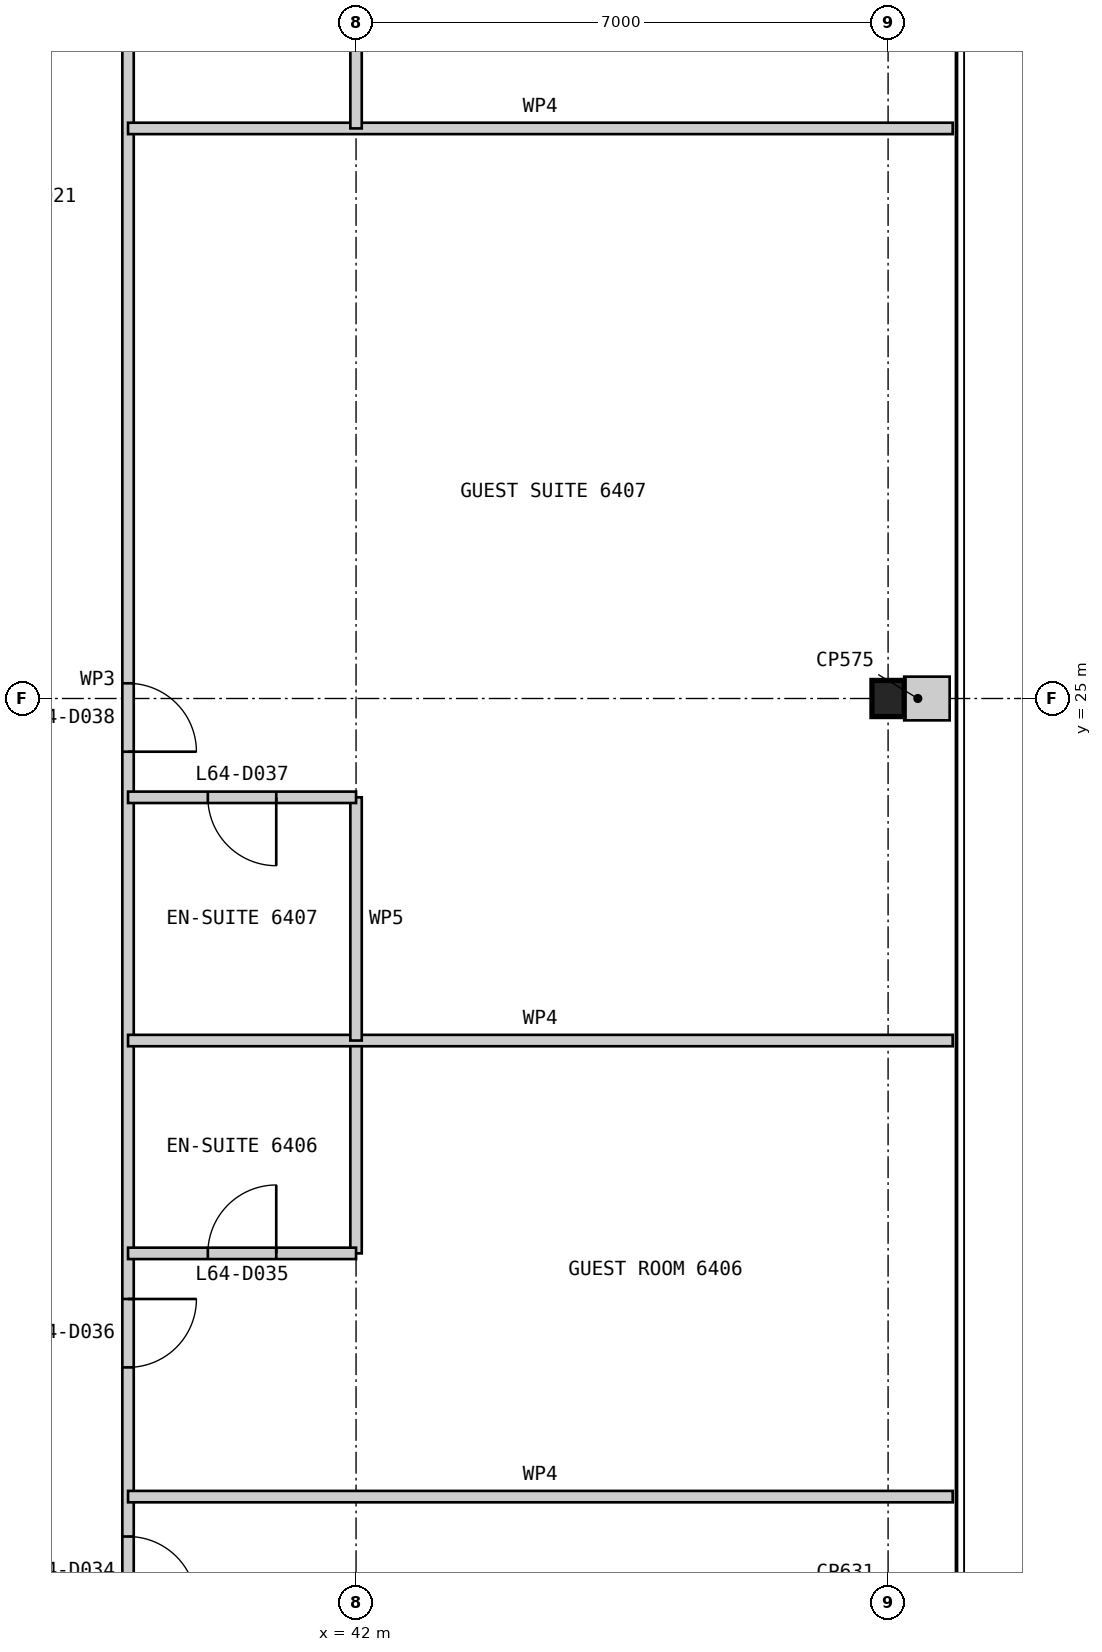
"""IFC4 building model, lengths in metres.
Left out: names, types, materials, properties, quantities, classifications, styles, units other than length and angle.
Written with IfcOpenShell. Run it as: python <this file> out.ifc"""

import sys

from ifc_helpers import new_model, si_unit, direction, frame, frame_2d, origin, origin_2d, place, context, subcontext, project, spatial, rectangle, i_section, extrude, element, fill, save


model = new_model("IFC4")
c1 = context("Model", 3, precision=1e-05, world=origin(), true_north=direction((0.0, 1.0)))
c2 = subcontext(c1, "Body", "Model", "MODEL_VIEW")
j1 = project(units=[si_unit("LENGTHUNIT", "METRE"), si_unit("PLANEANGLEUNIT", "RADIAN")], contexts=[c1])
p1 = place(None, origin())
s1 = spatial("IfcSite", under=j1, at=p1, CompositionType="ELEMENT")
p2 = place(p1, origin())
s2 = spatial("IfcBuilding", under=s1, at=p2, CompositionType="ELEMENT")
p3 = place(p2, frame((0.0, 0.0, 269.6)))
s3 = spatial("IfcBuildingStorey", under=s2, at=p3, CompositionType="ELEMENT", Elevation=269.6)
p4 = place(p3, frame((49.0, 25.0, 0.0), z_axis=(0.0, 0.0, 1.0), x_axis=(1.0, 0.0, 0.0)))
e1 = element("IfcColumn", 1, at=p4, inside=s3, PredefinedType="COLUMN", context=c2, shape_type="SweptSolid", body=[
    extrude(i_section(OverallWidth=0.424, OverallDepth=0.475, WebThickness=0.048, FlangeThickness=0.077, at=origin_2d()), origin(), (0.0, 0.0, 1.0), 3.4),
])
p5 = place(p3, frame((39.0, 11.0, 0.0), z_axis=(0.0, 0.0, 1.0), x_axis=(0.0, 1.0, 0.0)))
e2 = element("IfcWall", 2, at=p5, inside=s3, PredefinedType="PARTITIONING", context=c2, shape_type="SweptSolid", body=[
    extrude(rectangle(XDim=28.0, YDim=0.15, at=frame_2d((14.0, 0.0))), origin(), (0.0, 0.0, 1.0), 2.844),
])
p6 = place(p5, frame((2.075, 0.0, 0.0)))
e3 = element("IfcOpeningElement", 3, at=p6, cuts=e2, PredefinedType="OPENING", context=c2, shape_type="SweptSolid", body=[
    extrude(rectangle(XDim=0.9, YDim=2.1, at=frame_2d((0.45, 1.05))), frame((0.0, 0.085, 0.0), z_axis=(0.0, -1.0, 0.0), x_axis=(1.0, 0.0, 0.0)), (0.0, 0.0, 1.0), 0.17),
])
p7 = place(p5, frame((5.2, 0.0, 0.0)))
e4 = element("IfcOpeningElement", 4, at=p7, cuts=e2, PredefinedType="OPENING", context=c2, shape_type="SweptSolid", body=[
    extrude(rectangle(XDim=0.9, YDim=2.1, at=frame_2d((0.45, 1.05))), frame((0.0, 0.085, 0.0), z_axis=(0.0, -1.0, 0.0), x_axis=(1.0, 0.0, 0.0)), (0.0, 0.0, 1.0), 0.17),
])
p8 = place(p5, frame((13.3, 0.0, 0.0)))
e5 = element("IfcOpeningElement", 5, at=p8, cuts=e2, PredefinedType="OPENING", context=c2, shape_type="SweptSolid", body=[
    extrude(rectangle(XDim=0.9, YDim=2.1, at=frame_2d((0.45, 1.05))), frame((0.0, 0.085, 0.0), z_axis=(0.0, -1.0, 0.0), x_axis=(1.0, 0.0, 0.0)), (0.0, 0.0, 1.0), 0.17),
])
p9 = place(p5, frame((24.9, 0.0, 0.0)))
e6 = element("IfcOpeningElement", 6, at=p9, cuts=e2, PredefinedType="OPENING", context=c2, shape_type="SweptSolid", body=[
    extrude(rectangle(XDim=0.9, YDim=2.1, at=frame_2d((0.45, 1.05))), frame((0.0, 0.085, 0.0), z_axis=(0.0, -1.0, 0.0), x_axis=(1.0, 0.0, 0.0)), (0.0, 0.0, 1.0), 0.17),
])
p10 = place(p3, frame((49.85, 14.5, 0.0), z_axis=(0.0, 0.0, 1.0), x_axis=(-1.0, 0.0, 0.0)))
e7 = element("IfcWall", 7, at=p10, inside=s3, PredefinedType="PARTITIONING", context=c2, shape_type="SweptSolid", body=[
    extrude(rectangle(XDim=10.85, YDim=0.15, at=frame_2d((5.425, 0.0))), origin(), (0.0, 0.0, 1.0), 3.25),
])
p11 = place(p3, frame((42.0, 17.7, 0.0), z_axis=(0.0, 0.0, 1.0), x_axis=(0.0, 1.0, 0.0)))
e8 = element("IfcWall", 8, at=p11, inside=s3, PredefinedType="PARTITIONING", context=c2, shape_type="SweptSolid", body=[
    extrude(rectangle(XDim=2.8, YDim=0.15, at=frame_2d((1.4, 0.0))), origin(), (0.0, 0.0, 1.0), 3.25),
])
p12 = place(p3, frame((42.0, 17.7, 0.0), z_axis=(0.0, 0.0, 1.0), x_axis=(-1.0, 0.0, 0.0)))
e9 = element("IfcWall", 9, at=p12, inside=s3, PredefinedType="PARTITIONING", context=c2, shape_type="SweptSolid", body=[
    extrude(rectangle(XDim=3.0, YDim=0.15, at=frame_2d((1.5, 0.0))), origin(), (0.0, 0.0, 1.0), 3.25),
])
p13 = place(p12, frame((1.05, 0.0, 0.0)))
e10 = element("IfcOpeningElement", 10, at=p13, cuts=e9, PredefinedType="OPENING", context=c2, shape_type="SweptSolid", body=[
    extrude(rectangle(XDim=0.9, YDim=2.1, at=frame_2d((0.45, 1.05))), frame((0.0, 0.085, 0.0), z_axis=(0.0, -1.0, 0.0), x_axis=(1.0, 0.0, 0.0)), (0.0, 0.0, 1.0), 0.17),
])
p14 = place(p3, frame((49.85, 20.5, 0.0), z_axis=(0.0, 0.0, 1.0), x_axis=(-1.0, 0.0, 0.0)))
e11 = element("IfcWall", 11, at=p14, inside=s3, PredefinedType="PARTITIONING", context=c2, shape_type="SweptSolid", body=[
    extrude(rectangle(XDim=10.85, YDim=0.15, at=frame_2d((5.425, 0.0))), origin(), (0.0, 0.0, 1.0), 3.25),
])
p15 = place(p3, frame((42.0, 20.5, 0.0), z_axis=(0.0, 0.0, 1.0), x_axis=(0.0, 1.0, 0.0)))
e12 = element("IfcWall", 12, at=p15, inside=s3, PredefinedType="PARTITIONING", context=c2, shape_type="SweptSolid", body=[
    extrude(rectangle(XDim=3.2, YDim=0.15, at=frame_2d((1.6, 0.0))), origin(), (0.0, 0.0, 1.0), 3.25),
])
p16 = place(p3, frame((42.0, 23.7, 0.0), z_axis=(0.0, 0.0, 1.0), x_axis=(-1.0, 0.0, 0.0)))
e13 = element("IfcWall", 13, at=p16, inside=s3, PredefinedType="PARTITIONING", context=c2, shape_type="SweptSolid", body=[
    extrude(rectangle(XDim=3.0, YDim=0.15, at=frame_2d((1.5, 0.0))), origin(), (0.0, 0.0, 1.0), 3.25),
])
p17 = place(p16, frame((1.05, 0.0, 0.0)))
e14 = element("IfcOpeningElement", 14, at=p17, cuts=e13, PredefinedType="OPENING", context=c2, shape_type="SweptSolid", body=[
    extrude(rectangle(XDim=0.9, YDim=2.1, at=frame_2d((0.45, 1.05))), frame((0.0, 0.085, 0.0), z_axis=(0.0, -1.0, 0.0), x_axis=(1.0, 0.0, 0.0)), (0.0, 0.0, 1.0), 0.17),
])
p18 = place(p3, frame((49.85, 32.5, 0.0), z_axis=(0.0, 0.0, 1.0), x_axis=(-1.0, 0.0, 0.0)))
e15 = element("IfcWall", 15, at=p18, inside=s3, PredefinedType="PARTITIONING", context=c2, shape_type="SweptSolid", body=[
    extrude(rectangle(XDim=10.85, YDim=0.15, at=frame_2d((5.425, 0.0))), origin(), (0.0, 0.0, 1.0), 3.25),
])
p19 = place(p3, frame((42.0, 32.5, 0.0), z_axis=(0.0, 0.0, 1.0), x_axis=(0.0, 1.0, 0.0)))
e16 = element("IfcWall", 16, at=p19, inside=s3, PredefinedType="PARTITIONING", context=c2, shape_type="SweptSolid", body=[
    extrude(rectangle(XDim=2.8, YDim=0.15, at=frame_2d((1.4, 0.0))), origin(), (0.0, 0.0, 1.0), 3.25),
])
p20 = place(p3, frame((49.81, 25.0, 0.0), z_axis=(0.0, 0.0, 1.0), x_axis=(-1.0, 0.0, 0.0)))
e17 = element("IfcWall", 17, at=p20, inside=s3, PredefinedType="PARTITIONING", context=c2, shape_type="SweptSolid", body=[
    extrude(rectangle(XDim=0.598, YDim=0.575, at=frame_2d((0.299, 0.0))), origin(), (0.0, 0.0, 1.0), 3.25),
])
p21 = place(p6, frame((0.9, 0.0, 0.0), z_axis=(0.0, 0.0, 1.0), x_axis=(-1.0, 0.0, 0.0)))
e18 = element("IfcDoor", 18, at=p21, inside=s3, OperationType="SINGLE_SWING_RIGHT", PredefinedType="DOOR", context=c2, shape_type="SweptSolid", body=[
    extrude(rectangle(XDim=0.9, YDim=2.1, at=frame_2d((0.45, 1.05))), frame((0.0, 0.025, 0.0), z_axis=(0.0, -1.0, 0.0), x_axis=(1.0, 0.0, 0.0)), (0.0, 0.0, 1.0), 0.05),
])
fill(e3, e18)
p22 = place(p13, frame((0.9, 0.0, 0.0), z_axis=(0.0, 0.0, 1.0), x_axis=(-1.0, 0.0, 0.0)))
e19 = element("IfcDoor", 19, at=p22, inside=s3, OperationType="SINGLE_SWING_RIGHT", PredefinedType="DOOR", context=c2, shape_type="SweptSolid", body=[
    extrude(rectangle(XDim=0.9, YDim=2.1, at=frame_2d((0.45, 1.05))), frame((0.0, 0.025, 0.0), z_axis=(0.0, -1.0, 0.0), x_axis=(1.0, 0.0, 0.0)), (0.0, 0.0, 1.0), 0.05),
])
fill(e10, e19)
p23 = place(p7, frame((0.9, 0.0, 0.0), z_axis=(0.0, 0.0, 1.0), x_axis=(-1.0, 0.0, 0.0)))
e20 = element("IfcDoor", 20, at=p23, inside=s3, OperationType="SINGLE_SWING_LEFT", PredefinedType="DOOR", context=c2, shape_type="SweptSolid", body=[
    extrude(rectangle(XDim=0.9, YDim=2.1, at=frame_2d((0.45, 1.05))), frame((0.0, 0.025, 0.0), z_axis=(0.0, -1.0, 0.0), x_axis=(1.0, 0.0, 0.0)), (0.0, 0.0, 1.0), 0.05),
])
fill(e4, e20)
p24 = place(p17, origin())
e21 = element("IfcDoor", 21, at=p24, inside=s3, OperationType="SINGLE_SWING_LEFT", PredefinedType="DOOR", context=c2, shape_type="SweptSolid", body=[
    extrude(rectangle(XDim=0.9, YDim=2.1, at=frame_2d((0.45, 1.05))), frame((0.0, 0.025, 0.0), z_axis=(0.0, -1.0, 0.0), x_axis=(1.0, 0.0, 0.0)), (0.0, 0.0, 1.0), 0.05),
])
fill(e14, e21)
p25 = place(p8, frame((0.9, 0.0, 0.0), z_axis=(0.0, 0.0, 1.0), x_axis=(-1.0, 0.0, 0.0)))
e22 = element("IfcDoor", 22, at=p25, inside=s3, OperationType="SINGLE_SWING_RIGHT", PredefinedType="DOOR", context=c2, shape_type="SweptSolid", body=[
    extrude(rectangle(XDim=0.9, YDim=2.1, at=frame_2d((0.45, 1.05))), frame((0.0, 0.025, 0.0), z_axis=(0.0, -1.0, 0.0), x_axis=(1.0, 0.0, 0.0)), (0.0, 0.0, 1.0), 0.05),
])
fill(e5, e22)
save(model, sys.argv[1])
